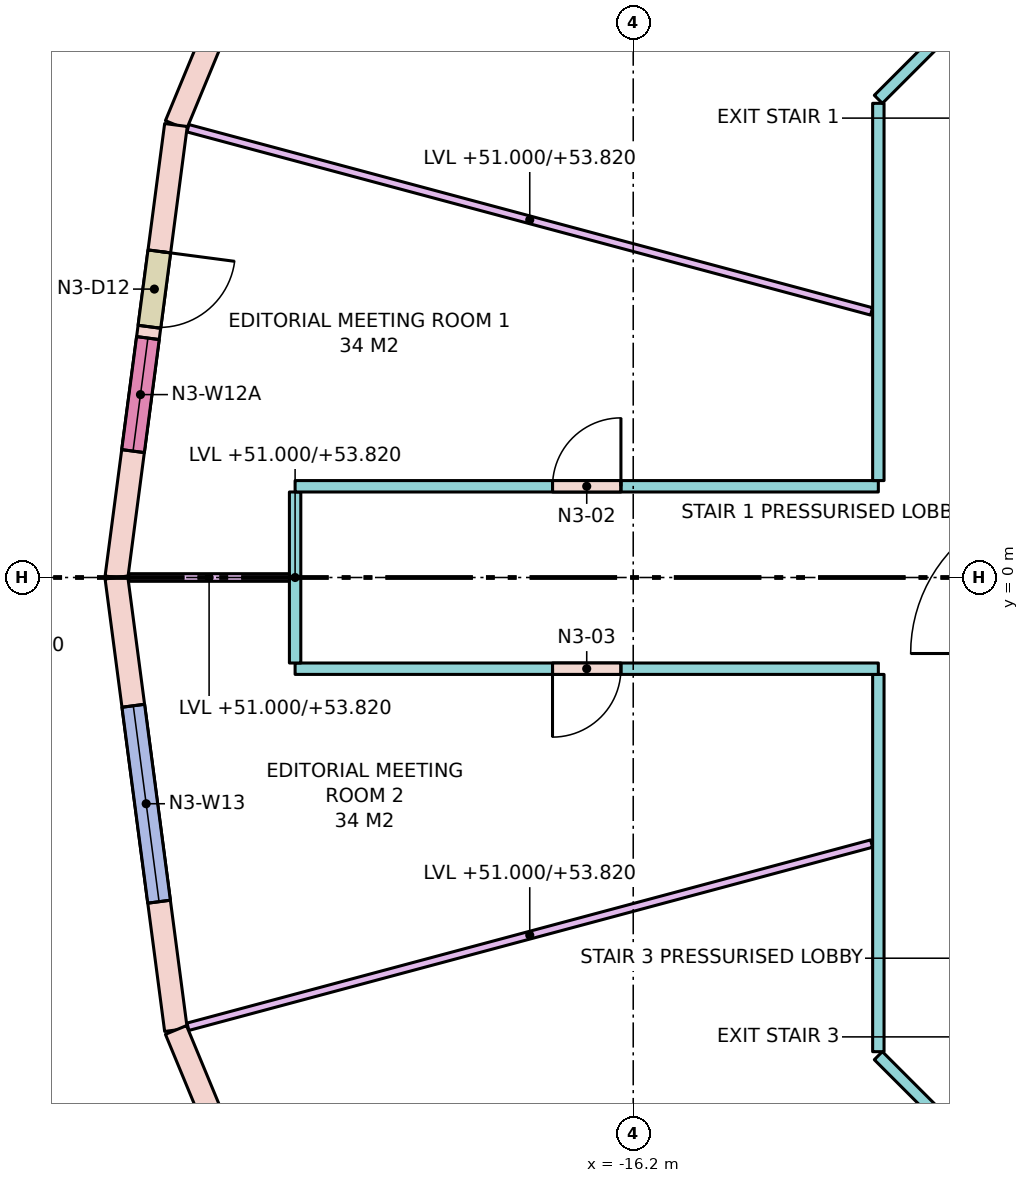
"""IFC4 building model, lengths in metres.
Left out: names, types, materials, properties, quantities, classifications, styles, units other than length and angle.
Written with IfcOpenShell. Run it as: python <this file> out.ifc"""

import sys

from ifc_helpers import new_model, si_unit, direction, frame, frame_2d, origin, place, context, subcontext, project, spatial, rectangle, extrude, element, fill, save


model = new_model("IFC4")
c1 = context("Model", 3, precision=1e-05, world=origin(), true_north=direction((0.0, 1.0)))
c2 = subcontext(c1, "Body", "Model", "MODEL_VIEW")
j1 = project(units=[si_unit("LENGTHUNIT", "METRE"), si_unit("PLANEANGLEUNIT", "RADIAN")], contexts=[c1])
p1 = place(None, origin())
s1 = spatial("IfcSite", under=j1, at=p1, CompositionType="ELEMENT")
p2 = place(p1, origin())
s2 = spatial("IfcBuilding", under=s1, at=p2, CompositionType="ELEMENT")
p3 = place(p2, frame((0.0, 0.0, 51.0)))
s3 = spatial("IfcBuildingStorey", under=s2, at=p3, CompositionType="ELEMENT", Elevation=51.0)
p4 = place(p3, frame((-19.919, 11.5, 0.0), z_axis=(0.0, 0.0, 1.0), x_axis=(-0.382671411433, -0.923884511653, 0.0)))
e1 = element("IfcWall", 1, at=p4, inside=s3, PredefinedType="STANDARD", context=c2, shape_type="SweptSolid", body=[
    extrude(rectangle(XDim=6.004, YDim=0.3, at=frame_2d((3.002, 0.0))), origin(), (0.0, 0.0, 1.0), 3.72),
])
p5 = place(p4, frame((1.702, 0.0, 0.8)))
e2 = element("IfcOpeningElement", 2, at=p5, cuts=e1, PredefinedType="OPENING", context=c2, shape_type="SweptSolid", body=[
    extrude(rectangle(XDim=2.6, YDim=2.7, at=frame_2d((1.3, 1.35))), frame((0.0, 0.16, 0.0), z_axis=(0.0, -1.0, 0.0), x_axis=(1.0, 0.0, 0.0)), (0.0, 0.0, 1.0), 0.32),
])
p6 = place(p3, frame((-22.216, 5.953, 0.0), z_axis=(0.0, 0.0, 1.0), x_axis=(-0.130522880875, -0.991445297315, 0.0)))
e3 = element("IfcWall", 3, at=p6, inside=s3, PredefinedType="STANDARD", context=c2, shape_type="SweptSolid", body=[
    extrude(rectangle(XDim=6.004, YDim=0.3, at=frame_2d((3.002, 0.0))), origin(), (0.0, 0.0, 1.0), 3.72),
])
p7 = place(p6, frame((1.677, 0.0, 0.0)))
e4 = element("IfcOpeningElement", 4, at=p7, cuts=e3, PredefinedType="OPENING", context=c2, shape_type="SweptSolid", body=[
    extrude(rectangle(XDim=1.0, YDim=2.4, at=frame_2d((0.5, 1.2))), frame((0.0, 0.16, 0.0), z_axis=(0.0, -1.0, 0.0), x_axis=(1.0, 0.0, 0.0)), (0.0, 0.0, 1.0), 0.32),
])
p8 = place(p6, frame((2.827, 0.0, 0.8)))
e5 = element("IfcOpeningElement", 5, at=p8, cuts=e3, PredefinedType="OPENING", context=c2, shape_type="SweptSolid", body=[
    extrude(rectangle(XDim=1.5, YDim=2.7, at=frame_2d((0.75, 1.35))), frame((0.0, 0.16, 0.0), z_axis=(0.0, -1.0, 0.0), x_axis=(1.0, 0.0, 0.0)), (0.0, 0.0, 1.0), 0.32),
])
p9 = place(p3, frame((-23.0, 0.0, 0.0), z_axis=(0.0, 0.0, 1.0), x_axis=(0.130522880875, -0.991445297315, 0.0)))
e6 = element("IfcWall", 6, at=p9, inside=s3, PredefinedType="STANDARD", context=c2, shape_type="SweptSolid", body=[
    extrude(rectangle(XDim=6.004, YDim=0.3, at=frame_2d((3.002, 0.0))), origin(), (0.0, 0.0, 1.0), 3.72),
])
p10 = place(p9, frame((1.702, 0.0, 0.8)))
e7 = element("IfcOpeningElement", 7, at=p10, cuts=e6, PredefinedType="OPENING", context=c2, shape_type="SweptSolid", body=[
    extrude(rectangle(XDim=2.6, YDim=2.7, at=frame_2d((1.3, 1.35))), frame((0.0, 0.16, 0.0), z_axis=(0.0, -1.0, 0.0), x_axis=(1.0, 0.0, 0.0)), (0.0, 0.0, 1.0), 0.32),
])
p11 = place(p3, frame((-22.216, -5.953, 0.0), z_axis=(0.0, 0.0, 1.0), x_axis=(0.382671411433, -0.923884511653, 0.0)))
e8 = element("IfcWall", 8, at=p11, inside=s3, PredefinedType="STANDARD", context=c2, shape_type="SweptSolid", body=[
    extrude(rectangle(XDim=6.004, YDim=0.3, at=frame_2d((3.002, 0.0))), origin(), (0.0, 0.0, 1.0), 3.72),
])
p12 = place(p11, frame((1.677, 0.0, 0.0)))
e9 = element("IfcOpeningElement", 9, at=p12, cuts=e8, PredefinedType="OPENING", context=c2, shape_type="SweptSolid", body=[
    extrude(rectangle(XDim=1.0, YDim=2.4, at=frame_2d((0.5, 1.2))), frame((0.0, 0.16, 0.0), z_axis=(0.0, -1.0, 0.0), x_axis=(1.0, 0.0, 0.0)), (0.0, 0.0, 1.0), 0.32),
])
p13 = place(p11, frame((2.827, 0.0, 0.8)))
e10 = element("IfcOpeningElement", 10, at=p13, cuts=e8, PredefinedType="OPENING", context=c2, shape_type="SweptSolid", body=[
    extrude(rectangle(XDim=1.5, YDim=2.7, at=frame_2d((0.75, 1.35))), frame((0.0, 0.16, 0.0), z_axis=(0.0, -1.0, 0.0), x_axis=(1.0, 0.0, 0.0)), (0.0, 0.0, 1.0), 0.32),
])
p14 = place(p3, frame((-8.328, -10.938, 0.0), z_axis=(0.0, 0.0, 1.0), x_axis=(-0.707125355289, 0.707088206597, 0.0)))
e11 = element("IfcWall", 11, at=p14, inside=s3, PredefinedType="PARTITIONING", context=c2, shape_type="SweptSolid", body=[
    extrude(rectangle(XDim=6.572, YDim=0.15, at=frame_2d((3.286, 0.0))), origin(), (0.0, 0.0, 1.0), 2.82),
])
p15 = place(p14, frame((2.386, 0.0, 0.0)))
e12 = element("IfcOpeningElement", 12, at=p15, cuts=e11, PredefinedType="OPENING", context=c2, shape_type="SweptSolid", body=[
    extrude(rectangle(XDim=1.8, YDim=2.1, at=frame_2d((0.9, 1.05))), frame((0.0, 0.085, 0.0), z_axis=(0.0, -1.0, 0.0), x_axis=(1.0, 0.0, 0.0)), (0.0, 0.0, 1.0), 0.17),
])
p16 = place(p3, frame((-12.975, -6.238, 0.0), z_axis=(0.0, 0.0, 1.0), x_axis=(0.0, 1.0, 0.0)))
e13 = element("IfcWall", 13, at=p16, inside=s3, PredefinedType="PARTITIONING", context=c2, shape_type="SweptSolid", body=[
    extrude(rectangle(XDim=4.963, YDim=0.15, at=frame_2d((2.482, 0.0))), origin(), (0.0, 0.0, 1.0), 2.82),
])
p17 = place(p3, frame((-12.975, -1.2, 0.0), z_axis=(0.0, 0.0, 1.0), x_axis=(-1.0, 0.0, 0.0)))
e14 = element("IfcWall", 14, at=p17, inside=s3, PredefinedType="PARTITIONING", context=c2, shape_type="SweptSolid", body=[
    extrude(rectangle(XDim=7.674, YDim=0.15, at=frame_2d((3.837, 0.0))), origin(), (0.0, 0.0, 1.0), 3.72),
])
p18 = place(p17, frame((3.387, 0.0, 0.0)))
e15 = element("IfcOpeningElement", 15, at=p18, cuts=e14, PredefinedType="OPENING", context=c2, shape_type="SweptSolid", body=[
    extrude(rectangle(XDim=0.9, YDim=2.1, at=frame_2d((0.45, 1.05))), frame((0.0, 0.085, 0.0), z_axis=(0.0, -1.0, 0.0), x_axis=(1.0, 0.0, 0.0)), (0.0, 0.0, 1.0), 0.17),
])
p19 = place(p3, frame((-20.649, -1.125, 0.0), z_axis=(0.0, 0.0, 1.0), x_axis=(0.0, 1.0, 0.0)))
e16 = element("IfcWall", 16, at=p19, inside=s3, PredefinedType="PARTITIONING", context=c2, shape_type="SweptSolid", body=[
    extrude(rectangle(XDim=2.25, YDim=0.15, at=frame_2d((1.125, 0.0))), origin(), (0.0, 0.0, 1.0), 2.82),
])
p20 = place(p3, frame((-20.649, 1.2, 0.0), z_axis=(0.0, 0.0, 1.0), x_axis=(1.0, 0.0, 0.0)))
e17 = element("IfcWall", 17, at=p20, inside=s3, PredefinedType="PARTITIONING", context=c2, shape_type="SweptSolid", body=[
    extrude(rectangle(XDim=7.674, YDim=0.15, at=frame_2d((3.837, 0.0))), origin(), (0.0, 0.0, 1.0), 3.72),
])
p21 = place(p20, frame((3.387, 0.0, 0.0)))
e18 = element("IfcOpeningElement", 18, at=p21, cuts=e17, PredefinedType="OPENING", context=c2, shape_type="SweptSolid", body=[
    extrude(rectangle(XDim=0.9, YDim=2.1, at=frame_2d((0.45, 1.05))), frame((0.0, 0.085, 0.0), z_axis=(0.0, -1.0, 0.0), x_axis=(1.0, 0.0, 0.0)), (0.0, 0.0, 1.0), 0.17),
])
p22 = place(p3, frame((-12.975, 1.275, 0.0), z_axis=(0.0, 0.0, 1.0), x_axis=(0.0, 1.0, 0.0)))
e19 = element("IfcWall", 19, at=p22, inside=s3, PredefinedType="PARTITIONING", context=c2, shape_type="SweptSolid", body=[
    extrude(rectangle(XDim=4.963, YDim=0.15, at=frame_2d((2.482, 0.0))), origin(), (0.0, 0.0, 1.0), 2.82),
])
p23 = place(p3, frame((-12.975, 6.291, 0.0), z_axis=(0.0, 0.0, 1.0), x_axis=(0.707125355289, 0.707088206597, 0.0)))
e20 = element("IfcWall", 20, at=p23, inside=s3, PredefinedType="PARTITIONING", context=c2, shape_type="SweptSolid", body=[
    extrude(rectangle(XDim=6.572, YDim=0.15, at=frame_2d((3.286, 0.0))), origin(), (0.0, 0.0, 1.0), 2.82),
])
p24 = place(p3, frame((-13.064, 3.5, 0.0), z_axis=(0.0, 0.0, 1.0), x_axis=(-0.965922655056, 0.258830880017, 0.0)))
e21 = element("IfcWall", 21, at=p24, inside=s3, PredefinedType="PARTITIONING", context=c2, shape_type="SweptSolid", body=[
    extrude(rectangle(XDim=9.312, YDim=0.1, at=frame_2d((4.656, 0.0))), origin(), (0.0, 0.0, 1.0), 2.82),
])
p25 = place(p3, frame((-20.724, 0.0, 0.0), z_axis=(0.0, 0.0, 1.0), x_axis=(-1.0, 0.0, 0.0)))
e22 = element("IfcWall", 22, at=p25, inside=s3, PredefinedType="PARTITIONING", context=c2, shape_type="SweptSolid", body=[
    extrude(rectangle(XDim=2.113, YDim=0.1, at=frame_2d((1.057, 0.0))), origin(), (0.0, 0.0, 1.0), 2.82),
])
p26 = place(p3, frame((-13.064, -3.5, 0.0), z_axis=(0.0, 0.0, 1.0), x_axis=(-0.965922655056, -0.258830880017, 0.0)))
e23 = element("IfcWall", 23, at=p26, inside=s3, PredefinedType="PARTITIONING", context=c2, shape_type="SweptSolid", body=[
    extrude(rectangle(XDim=9.312, YDim=0.1, at=frame_2d((4.656, 0.0))), origin(), (0.0, 0.0, 1.0), 2.82),
])
p27 = place(p7, origin())
e24 = element("IfcDoor", 24, at=p27, inside=s3, OperationType="SINGLE_SWING_LEFT", PredefinedType="DOOR", context=c2, shape_type="SweptSolid", body=[
    extrude(rectangle(XDim=1.0, YDim=2.4, at=frame_2d((0.5, 1.2))), frame((0.0, 0.025, 0.0), z_axis=(0.0, -1.0, 0.0), x_axis=(1.0, 0.0, 0.0)), (0.0, 0.0, 1.0), 0.05),
])
fill(e4, e24)
p28 = place(p8, origin())
e25 = element("IfcWindow", 25, at=p28, inside=s3, PartitioningType="SINGLE_PANEL", PredefinedType="WINDOW", context=c2, shape_type="SweptSolid", body=[
    extrude(rectangle(XDim=1.5, YDim=2.7, at=frame_2d((0.75, 1.35))), frame((0.0, 0.03, 0.0), z_axis=(0.0, -1.0, 0.0), x_axis=(1.0, 0.0, 0.0)), (0.0, 0.0, 1.0), 0.06),
])
fill(e5, e25)
p29 = place(p10, origin())
e26 = element("IfcWindow", 26, at=p29, inside=s3, PartitioningType="SINGLE_PANEL", PredefinedType="WINDOW", context=c2, shape_type="SweptSolid", body=[
    extrude(rectangle(XDim=2.6, YDim=2.7, at=frame_2d((1.3, 1.35))), frame((0.0, 0.03, 0.0), z_axis=(0.0, -1.0, 0.0), x_axis=(1.0, 0.0, 0.0)), (0.0, 0.0, 1.0), 0.06),
])
fill(e7, e26)
p30 = place(p21, origin())
e27 = element("IfcDoor", 27, at=p30, inside=s3, OperationType="SINGLE_SWING_RIGHT", PredefinedType="DOOR", context=c2, shape_type="SweptSolid", body=[
    extrude(rectangle(XDim=0.9, YDim=2.1, at=frame_2d((0.45, 1.05))), frame((0.0, 0.025, 0.0), z_axis=(0.0, -1.0, 0.0), x_axis=(1.0, 0.0, 0.0)), (0.0, 0.0, 1.0), 0.05),
])
fill(e18, e27)
p31 = place(p18, origin())
e28 = element("IfcDoor", 28, at=p31, inside=s3, OperationType="SINGLE_SWING_RIGHT", PredefinedType="DOOR", context=c2, shape_type="SweptSolid", body=[
    extrude(rectangle(XDim=0.9, YDim=2.1, at=frame_2d((0.45, 1.05))), frame((0.0, 0.025, 0.0), z_axis=(0.0, -1.0, 0.0), x_axis=(1.0, 0.0, 0.0)), (0.0, 0.0, 1.0), 0.05),
])
fill(e15, e28)
save(model, sys.argv[1])
